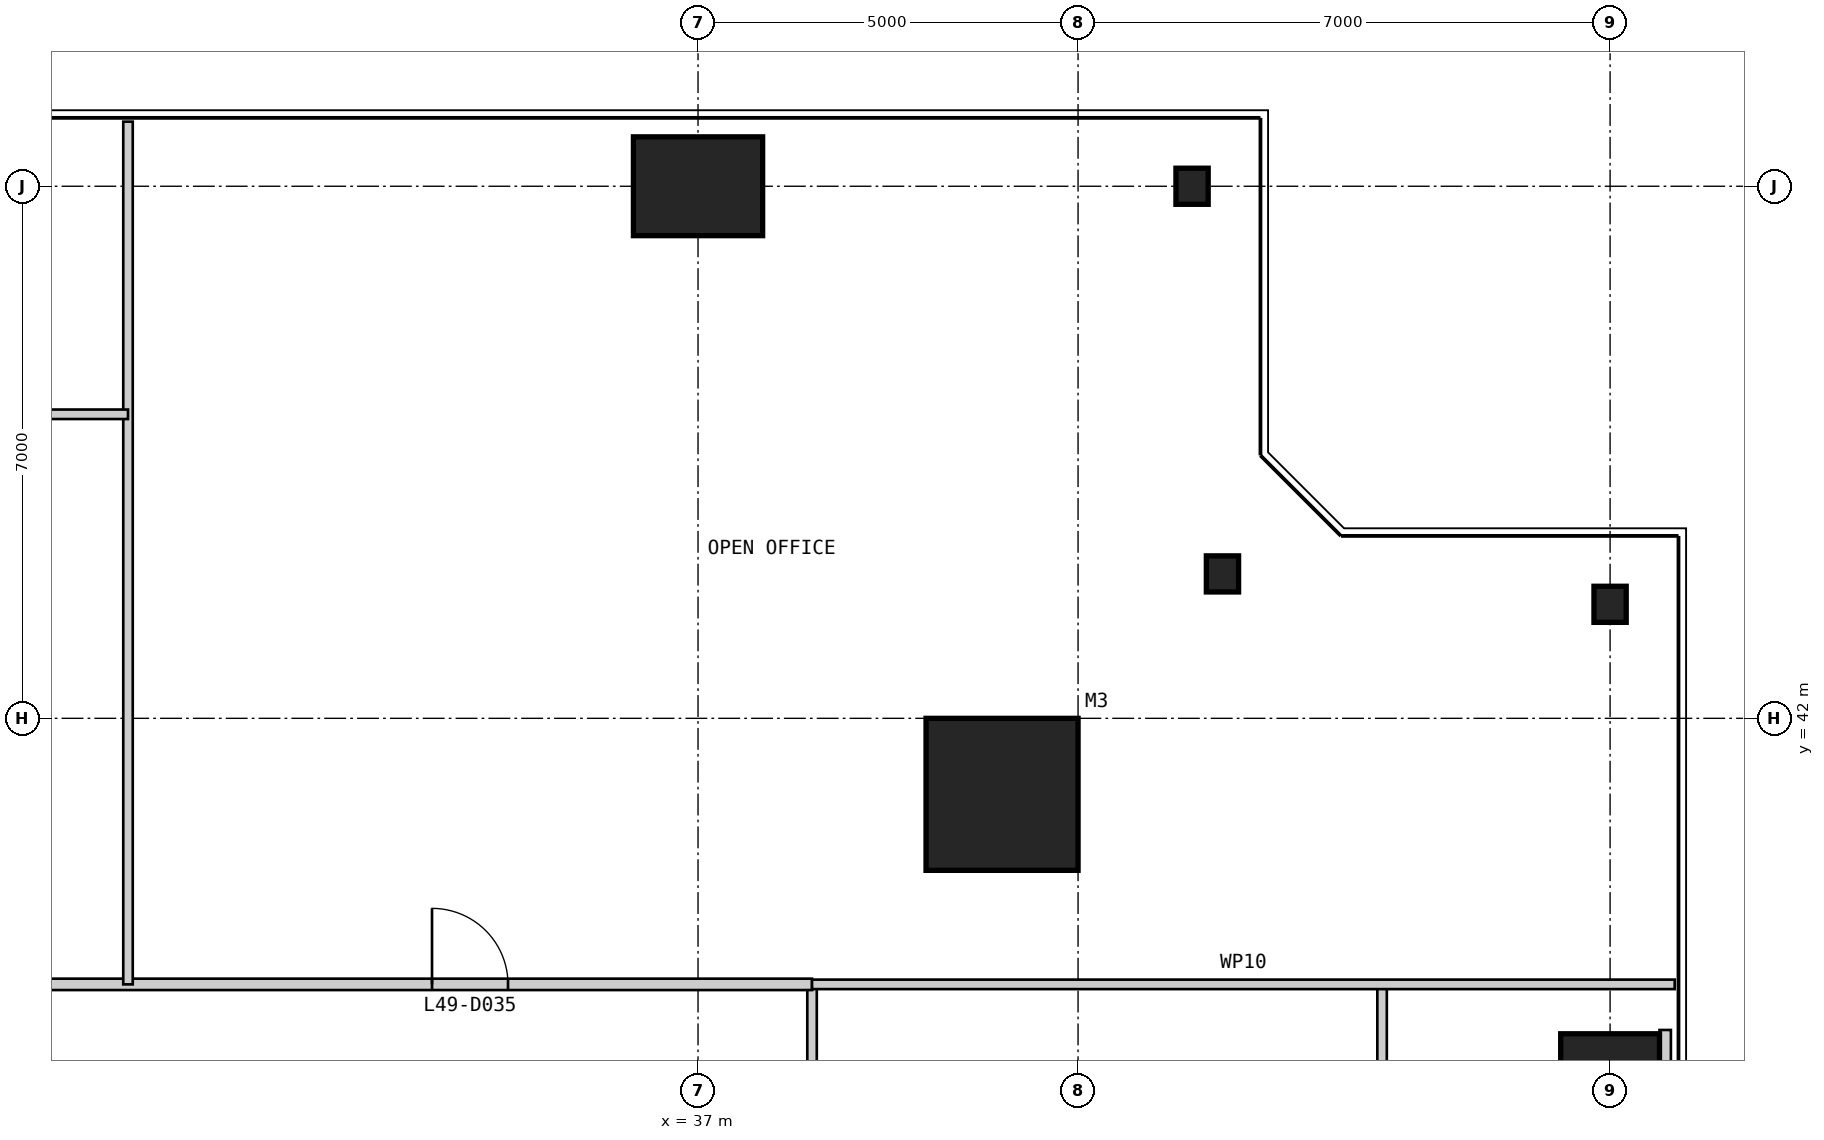
"""IFC4 building model, lengths in metres.
Left out: names, types, materials, properties, quantities, classifications, styles, units other than length and angle.
Written with IfcOpenShell. Run it as: python <this file> out.ifc"""

import sys

from ifc_helpers import new_model, si_unit, direction, frame, frame_2d, origin, origin_2d, place, context, subcontext, project, spatial, rectangle, i_section, extrude, element, fill, save


model = new_model("IFC4")
c1 = context("Model", 3, precision=1e-05, world=origin(), true_north=direction((0.0, 1.0)))
c2 = subcontext(c1, "Body", "Model", "MODEL_VIEW")
j1 = project(units=[si_unit("LENGTHUNIT", "METRE"), si_unit("PLANEANGLEUNIT", "RADIAN")], contexts=[c1])
p1 = place(None, origin())
s1 = spatial("IfcSite", under=j1, at=p1, CompositionType="ELEMENT")
p2 = place(p1, origin())
s2 = spatial("IfcBuilding", under=s1, at=p2, CompositionType="ELEMENT")
p3 = place(p2, frame((0.0, 0.0, 209.8)))
s3 = spatial("IfcBuildingStorey", under=s2, at=p3, CompositionType="ELEMENT", Elevation=209.8)
p4 = place(p3, frame((41.0, 41.0, 0.0), z_axis=(0.0, 0.0, 1.0), x_axis=(1.0, 0.0, 0.0)))
e1 = element("IfcColumn", 1, at=p4, inside=s3, PredefinedType="COLUMN", context=c2, shape_type="SweptSolid", body=[
    extrude(rectangle(XDim=2.0, YDim=2.0, at=origin_2d()), origin(), (0.0, 0.0, 1.0), 4.0),
])
p5 = place(p3, frame((49.0, 37.0, 0.0), z_axis=(0.0, 0.0, 1.0), x_axis=(1.0, 0.0, 0.0)))
e2 = element("IfcColumn", 2, at=p5, inside=s3, PredefinedType="COLUMN", context=c2, shape_type="SweptSolid", body=[
    extrude(rectangle(XDim=1.3, YDim=1.7, at=origin_2d()), origin(), (0.0, 0.0, 1.0), 4.0),
])
for number, where, z_axis, x_axis in (
    (3, (49.0, 43.5, 0.0), (0.0, 0.0, 1.0), (1.0, 0.0, 0.0)),
    (4, (43.9, 43.9, 0.0), (0.0, 0.0, 1.0), (1.0, 0.0, 0.0)),
    (5, (43.5, 49.0, 0.0), (0.0, 0.0, 1.0), (1.0, 0.0, 0.0)),
):
    element("IfcColumn", number, at=place(p3, frame(where, z_axis=z_axis, x_axis=x_axis)), inside=s3, PredefinedType="COLUMN", context=c2, shape_type="SweptSolid", body=[
        extrude(i_section(OverallWidth=0.424, OverallDepth=0.475, WebThickness=0.048, FlangeThickness=0.077, at=origin_2d()), origin(), (0.0, 0.0, 1.0), 4.0),
    ])
p6 = place(p3, frame((37.0, 49.0, 0.0), z_axis=(0.0, 0.0, 1.0), x_axis=(1.0, 0.0, 0.0)))
e6 = element("IfcColumn", 6, at=p6, inside=s3, PredefinedType="COLUMN", context=c2, shape_type="SweptSolid", body=[
    extrude(rectangle(XDim=1.7, YDim=1.3, at=origin_2d()), origin(), (0.0, 0.0, 1.0), 4.0),
])
p7 = place(p3, frame((46.0, 32.5, 0.0), z_axis=(0.0, 0.0, 1.0), x_axis=(0.0, 1.0, 0.0)))
e7 = element("IfcWall", 7, at=p7, inside=s3, PredefinedType="PARTITIONING", context=c2, shape_type="SweptSolid", body=[
    extrude(rectangle(XDim=6.0, YDim=0.125, at=frame_2d((3.0, 0.0))), origin(), (0.0, 0.0, 1.0), 3.238),
])
p8 = place(p3, frame((38.5, 35.5, 0.0), z_axis=(0.0, 0.0, 1.0), x_axis=(0.0, 1.0, 0.0)))
e8 = element("IfcWall", 8, at=p8, inside=s3, PredefinedType="PARTITIONING", context=c2, shape_type="SweptSolid", body=[
    extrude(rectangle(XDim=3.0, YDim=0.125, at=frame_2d((1.5, 0.0))), origin(), (0.0, 0.0, 1.0), 3.85),
])
p9 = place(p3, frame((38.5, 38.5, 0.0), z_axis=(0.0, 0.0, 1.0), x_axis=(-1.0, 0.0, 0.0)))
e9 = element("IfcWall", 9, at=p9, inside=s3, PredefinedType="PARTITIONING", context=c2, shape_type="SweptSolid", body=[
    extrude(rectangle(XDim=27.0, YDim=0.15, at=frame_2d((13.5, 0.0))), origin(), (0.0, 0.0, 1.0), 3.85),
])
p10 = place(p9, frame((13.0, 0.0, 0.0)))
e10 = element("IfcOpeningElement", 10, at=p10, cuts=e9, PredefinedType="OPENING", context=c2, shape_type="SweptSolid", body=[
    extrude(rectangle(XDim=1.0, YDim=2.2, at=frame_2d((0.5, 1.1))), frame((0.0, 0.085, 0.0), z_axis=(0.0, -1.0, 0.0), x_axis=(1.0, 0.0, 0.0)), (0.0, 0.0, 1.0), 0.17),
])
p11 = place(p9, frame((4.0, 0.0, 0.0)))
e11 = element("IfcOpeningElement", 11, at=p11, cuts=e9, PredefinedType="OPENING", context=c2, shape_type="SweptSolid", body=[
    extrude(rectangle(XDim=1.0, YDim=2.2, at=frame_2d((0.5, 1.1))), frame((0.0, 0.085, 0.0), z_axis=(0.0, -1.0, 0.0), x_axis=(1.0, 0.0, 0.0)), (0.0, 0.0, 1.0), 0.17),
])
p12 = place(p9, frame((22.0, 0.0, 0.0)))
e12 = element("IfcOpeningElement", 12, at=p12, cuts=e9, PredefinedType="OPENING", context=c2, shape_type="SweptSolid", body=[
    extrude(rectangle(XDim=1.0, YDim=2.2, at=frame_2d((0.5, 1.1))), frame((0.0, 0.085, 0.0), z_axis=(0.0, -1.0, 0.0), x_axis=(1.0, 0.0, 0.0)), (0.0, 0.0, 1.0), 0.17),
])
p13 = place(p9, frame((25.0, 0.0, 0.0)))
e13 = element("IfcOpeningElement", 13, at=p13, cuts=e9, PredefinedType="OPENING", context=c2, shape_type="SweptSolid", body=[
    extrude(rectangle(XDim=1.0, YDim=2.2, at=frame_2d((0.5, 1.1))), frame((0.0, 0.085, 0.0), z_axis=(0.0, -1.0, 0.0), x_axis=(1.0, 0.0, 0.0)), (0.0, 0.0, 1.0), 0.17),
])
for number, where, z_axis, x_axis in (
    (14, (49.85, 38.5, 0.0), (0.0, 0.0, 1.0), (-1.0, 0.0, 0.0)),
    (15, (29.5, 49.85, 0.0), (0.0, 0.0, 1.0), (0.0, -1.0, 0.0)),
):
    element("IfcWall", number, at=place(p3, frame(where, z_axis=z_axis, x_axis=x_axis)), inside=s3, PredefinedType="PARTITIONING", context=c2, shape_type="SweptSolid", body=[
        extrude(rectangle(XDim=11.35, YDim=0.125, at=frame_2d((5.675, 0.0))), origin(), (0.0, 0.0, 1.0), 3.85),
    ])
p14 = place(p3, frame((29.5, 46.0, 0.0), z_axis=(0.0, 0.0, 1.0), x_axis=(-1.0, 0.0, 0.0)))
e16 = element("IfcWall", 16, at=p14, inside=s3, PredefinedType="PARTITIONING", context=c2, shape_type="SweptSolid", body=[
    extrude(rectangle(XDim=12.0, YDim=0.125, at=frame_2d((6.0, 0.0))), origin(), (0.0, 0.0, 1.0), 3.85),
])
p15 = place(p14, frame((4.0, 0.0, 0.0)))
e17 = element("IfcOpeningElement", 17, at=p15, cuts=e16, PredefinedType="OPENING", context=c2, shape_type="SweptSolid", body=[
    extrude(rectangle(XDim=1.0, YDim=2.2, at=frame_2d((0.5, 1.1))), frame((0.0, 0.073, 0.0), z_axis=(0.0, -1.0, 0.0), x_axis=(1.0, 0.0, 0.0)), (0.0, 0.0, 1.0), 0.145),
])
p16 = place(p14, frame((7.0, 0.0, 0.0)))
e18 = element("IfcOpeningElement", 18, at=p16, cuts=e16, PredefinedType="OPENING", context=c2, shape_type="SweptSolid", body=[
    extrude(rectangle(XDim=1.0, YDim=2.2, at=frame_2d((0.5, 1.1))), frame((0.0, 0.073, 0.0), z_axis=(0.0, -1.0, 0.0), x_axis=(1.0, 0.0, 0.0)), (0.0, 0.0, 1.0), 0.145),
])
p17 = place(p3, frame((49.8, 37.0, 0.0), z_axis=(0.0, 0.0, 1.0), x_axis=(-1.0, 0.0, 0.0)))
e19 = element("IfcWall", 19, at=p17, inside=s3, PredefinedType="PARTITIONING", context=c2, shape_type="SweptSolid", body=[
    extrude(rectangle(XDim=0.15, YDim=1.8, at=frame_2d((0.075, 0.0))), origin(), (0.0, 0.0, 1.0), 3.85),
])
p18 = place(p11, frame((1.0, 0.0, 0.0), z_axis=(0.0, 0.0, 1.0), x_axis=(-1.0, 0.0, 0.0)))
e20 = element("IfcDoor", 20, at=p18, inside=s3, OperationType="SINGLE_SWING_LEFT", PredefinedType="DOOR", context=c2, shape_type="SweptSolid", body=[
    extrude(rectangle(XDim=1.0, YDim=2.2, at=frame_2d((0.5, 1.1))), frame((0.0, 0.025, 0.0), z_axis=(0.0, -1.0, 0.0), x_axis=(1.0, 0.0, 0.0)), (0.0, 0.0, 1.0), 0.05),
])
fill(e11, e20)
save(model, sys.argv[1])
